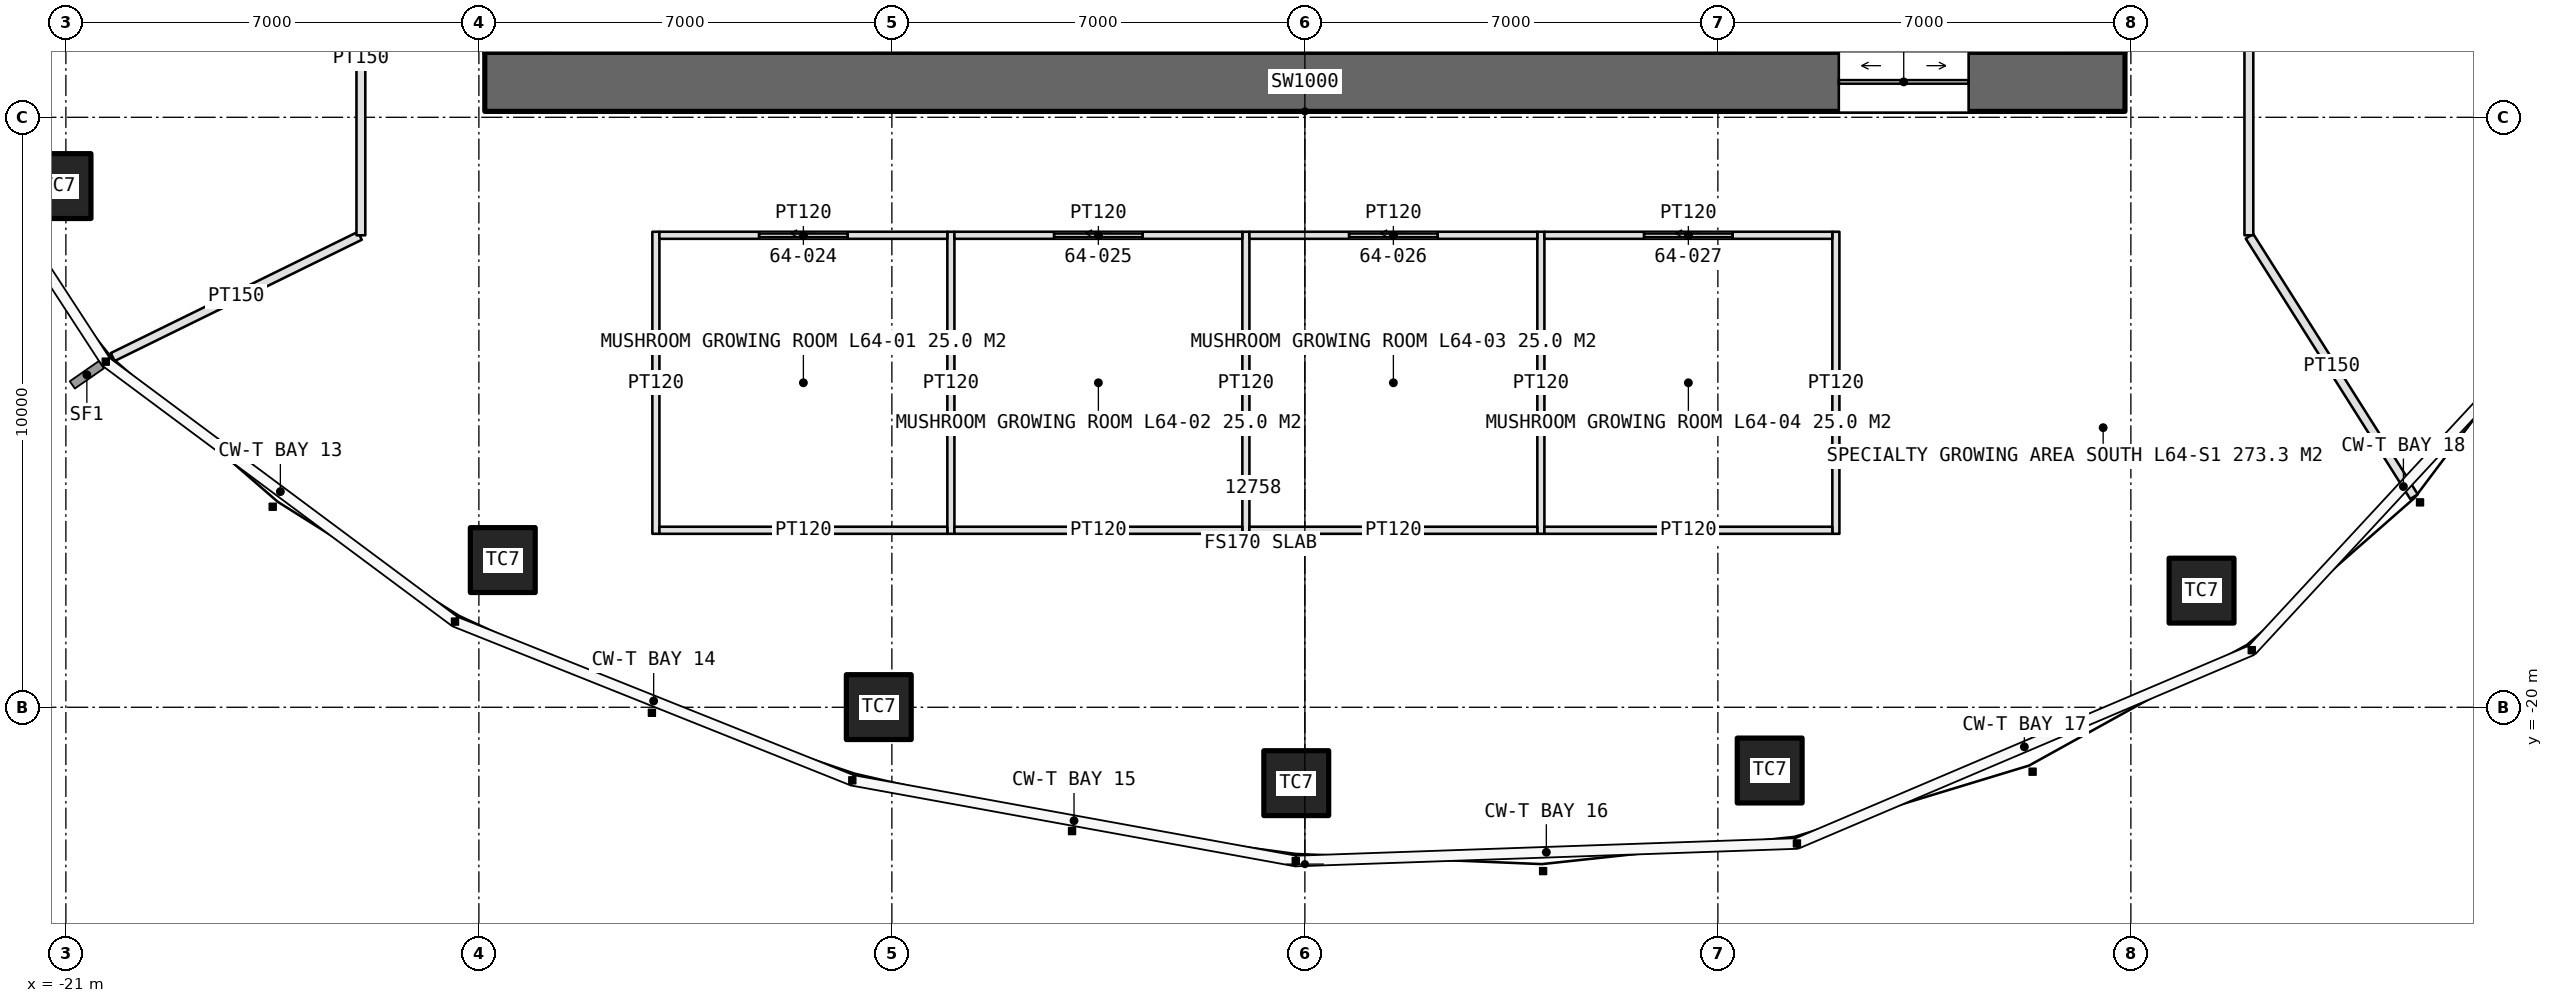
"""IFC4 building model, lengths in metres.
Left out: names, types, materials, properties, quantities, classifications, styles, units other than length and angle.
Written with IfcOpenShell. Run it as: python <this file> out.ifc"""

import sys

from ifc_helpers import new_model, si_unit, direction, frame, frame_2d, origin, origin_2d, place, context, subcontext, project, spatial, rectangle, extrude, element, fill, save


model = new_model("IFC4")
c1 = context("Model", 3, precision=1e-05, world=origin(), true_north=direction((0.0, 1.0)))
c2 = subcontext(c1, "Body", "Model", "MODEL_VIEW")
j1 = project(units=[si_unit("LENGTHUNIT", "METRE"), si_unit("PLANEANGLEUNIT", "RADIAN")], contexts=[c1])
p1 = place(None, origin())
s1 = spatial("IfcSite", under=j1, at=p1, CompositionType="ELEMENT")
p2 = place(p1, origin())
s2 = spatial("IfcBuilding", under=s1, at=p2, CompositionType="ELEMENT")
p3 = place(p2, frame((0.0, 0.0, 288.0)))
s3 = spatial("IfcBuildingStorey", under=s2, at=p3, CompositionType="ELEMENT", Elevation=288.0)
p4 = place(p3, frame((-13.9, -9.4, 0.0), z_axis=(0.0, 0.0, 1.0), x_axis=(1.0, 0.0, 0.0)))
e1 = element("IfcWall", 1, at=p4, inside=s3, PredefinedType="SHEAR", context=c2, shape_type="SweptSolid", body=[
    extrude(rectangle(XDim=27.8, YDim=1.0, at=frame_2d((13.9, 0.0))), origin(), (0.0, 0.0, 1.0), 4.2),
])
p5 = place(p4, frame((22.95, 0.0, 0.0)))
e2 = element("IfcOpeningElement", 2, at=p5, cuts=e1, PredefinedType="OPENING", context=c2, shape_type="SweptSolid", body=[
    extrude(rectangle(XDim=2.2, YDim=2.7, at=frame_2d((1.1, 1.35))), frame((0.0, 0.51, 0.0), z_axis=(0.0, -1.0, 0.0), x_axis=(1.0, 0.0, 0.0)), (0.0, 0.0, 1.0), 1.02),
])
for number, where, z_axis, x_axis in (
    (3, (-21.125, -11.166, 0.0), (0.0, 0.0, 1.0), (1.0, 0.0, 0.0)),
    (4, (-13.595, -17.505, 0.0), (0.0, 0.0, 1.0), (1.0, 0.0, 0.0)),
    (5, (-7.222, -19.997, 0.0), (0.0, 0.0, 1.0), (1.0, 0.0, 0.0)),
    (6, (-0.146, -21.286, 0.0), (0.0, 0.0, 1.0), (1.0, 0.0, 0.0)),
    (7, (7.878, -21.072, 0.0), (0.0, 0.0, 1.0), (1.0, 0.0, 0.0)),
    (8, (15.198, -18.023, 0.0), (0.0, 0.0, 1.0), (1.0, 0.0, 0.0)),
):
    element("IfcColumn", number, at=place(p3, frame(where, z_axis=z_axis, x_axis=x_axis)), inside=s3, PredefinedType="COLUMN", context=c2, shape_type="SweptSolid", body=[
        extrude(rectangle(XDim=1.1, YDim=1.1, at=origin_2d()), origin(), (0.0, 0.0, 1.0), 4.2),
    ])
for number, where, z_axis, x_axis in (
    (9, (-4.2, -4.7, 0.0), (0.0, 0.0, 1.0), (0.0, -1.0, 0.0)),
    (10, (-1.4, -4.7, 0.0), (0.0, 0.0, 1.0), (0.0, -1.0, 0.0)),
    (11, (1.4, -4.7, 0.0), (0.0, 0.0, 1.0), (0.0, -1.0, 0.0)),
    (12, (4.2, -4.7, 0.0), (0.0, 0.0, 1.0), (0.0, -1.0, 0.0)),
):
    element("IfcWall", number, at=place(p3, frame(where, z_axis=z_axis, x_axis=x_axis)), inside=s3, PredefinedType="PARTITIONING", context=c2, shape_type="SweptSolid", body=[
        extrude(rectangle(XDim=4.2, YDim=0.2, at=frame_2d((2.1, 0.0))), origin(), (0.0, 0.0, 1.0), 4.2),
    ])
for number, where, z_axis, x_axis in (
    (13, (-11.0, -11.94, 0.0), (0.0, 0.0, 1.0), (0.0, -1.0, 0.0)),
    (14, (-6.0, -11.94, 0.0), (0.0, 0.0, 1.0), (0.0, -1.0, 0.0)),
    (15, (-1.0, -11.94, 0.0), (0.0, 0.0, 1.0), (0.0, -1.0, 0.0)),
    (16, (4.0, -11.94, 0.0), (0.0, 0.0, 1.0), (0.0, -1.0, 0.0)),
    (17, (9.0, -11.94, 0.0), (0.0, 0.0, 1.0), (0.0, -1.0, 0.0)),
):
    element("IfcWall", number, at=place(p3, frame(where, z_axis=z_axis, x_axis=x_axis)), inside=s3, PredefinedType="PARTITIONING", context=c2, shape_type="SweptSolid", body=[
        extrude(rectangle(XDim=5.12, YDim=0.12, at=frame_2d((2.56, 0.0))), origin(), (0.0, 0.0, 1.0), 3.0),
    ])
p6 = place(p3, frame((-10.94, -12.0, 0.0), z_axis=(0.0, 0.0, 1.0), x_axis=(1.0, 0.0, 0.0)))
e18 = element("IfcWall", 18, at=p6, inside=s3, PredefinedType="PARTITIONING", context=c2, shape_type="SweptSolid", body=[
    extrude(rectangle(XDim=4.88, YDim=0.12, at=frame_2d((2.44, 0.0))), origin(), (0.0, 0.0, 1.0), 3.0),
])
p7 = place(p6, frame((1.69, 0.0, 0.0)))
e19 = element("IfcOpeningElement", 19, at=p7, cuts=e18, PredefinedType="OPENING", context=c2, shape_type="SweptSolid", body=[
    extrude(rectangle(XDim=1.5, YDim=2.5, at=frame_2d((0.75, 1.25))), frame((0.0, 0.07, 0.0), z_axis=(0.0, -1.0, 0.0), x_axis=(1.0, 0.0, 0.0)), (0.0, 0.0, 1.0), 0.14),
])
p8 = place(p3, frame((-10.94, -17.0, 0.0), z_axis=(0.0, 0.0, 1.0), x_axis=(1.0, 0.0, 0.0)))
e20 = element("IfcWall", 20, at=p8, inside=s3, PredefinedType="PARTITIONING", context=c2, shape_type="SweptSolid", body=[
    extrude(rectangle(XDim=4.88, YDim=0.12, at=frame_2d((2.44, 0.0))), origin(), (0.0, 0.0, 1.0), 3.0),
])
p9 = place(p3, frame((-5.94, -12.0, 0.0), z_axis=(0.0, 0.0, 1.0), x_axis=(1.0, 0.0, 0.0)))
e21 = element("IfcWall", 21, at=p9, inside=s3, PredefinedType="PARTITIONING", context=c2, shape_type="SweptSolid", body=[
    extrude(rectangle(XDim=4.88, YDim=0.12, at=frame_2d((2.44, 0.0))), origin(), (0.0, 0.0, 1.0), 3.0),
])
p10 = place(p9, frame((1.69, 0.0, 0.0)))
e22 = element("IfcOpeningElement", 22, at=p10, cuts=e21, PredefinedType="OPENING", context=c2, shape_type="SweptSolid", body=[
    extrude(rectangle(XDim=1.5, YDim=2.5, at=frame_2d((0.75, 1.25))), frame((0.0, 0.07, 0.0), z_axis=(0.0, -1.0, 0.0), x_axis=(1.0, 0.0, 0.0)), (0.0, 0.0, 1.0), 0.14),
])
p11 = place(p3, frame((-5.94, -17.0, 0.0), z_axis=(0.0, 0.0, 1.0), x_axis=(1.0, 0.0, 0.0)))
e23 = element("IfcWall", 23, at=p11, inside=s3, PredefinedType="PARTITIONING", context=c2, shape_type="SweptSolid", body=[
    extrude(rectangle(XDim=4.88, YDim=0.12, at=frame_2d((2.44, 0.0))), origin(), (0.0, 0.0, 1.0), 3.0),
])
p12 = place(p3, frame((-0.94, -12.0, 0.0), z_axis=(0.0, 0.0, 1.0), x_axis=(1.0, 0.0, 0.0)))
e24 = element("IfcWall", 24, at=p12, inside=s3, PredefinedType="PARTITIONING", context=c2, shape_type="SweptSolid", body=[
    extrude(rectangle(XDim=4.88, YDim=0.12, at=frame_2d((2.44, 0.0))), origin(), (0.0, 0.0, 1.0), 3.0),
])
p13 = place(p12, frame((1.69, 0.0, 0.0)))
e25 = element("IfcOpeningElement", 25, at=p13, cuts=e24, PredefinedType="OPENING", context=c2, shape_type="SweptSolid", body=[
    extrude(rectangle(XDim=1.5, YDim=2.5, at=frame_2d((0.75, 1.25))), frame((0.0, 0.07, 0.0), z_axis=(0.0, -1.0, 0.0), x_axis=(1.0, 0.0, 0.0)), (0.0, 0.0, 1.0), 0.14),
])
p14 = place(p3, frame((-0.94, -17.0, 0.0), z_axis=(0.0, 0.0, 1.0), x_axis=(1.0, 0.0, 0.0)))
e26 = element("IfcWall", 26, at=p14, inside=s3, PredefinedType="PARTITIONING", context=c2, shape_type="SweptSolid", body=[
    extrude(rectangle(XDim=4.88, YDim=0.12, at=frame_2d((2.44, 0.0))), origin(), (0.0, 0.0, 1.0), 3.0),
])
p15 = place(p3, frame((4.06, -12.0, 0.0), z_axis=(0.0, 0.0, 1.0), x_axis=(1.0, 0.0, 0.0)))
e27 = element("IfcWall", 27, at=p15, inside=s3, PredefinedType="PARTITIONING", context=c2, shape_type="SweptSolid", body=[
    extrude(rectangle(XDim=4.88, YDim=0.12, at=frame_2d((2.44, 0.0))), origin(), (0.0, 0.0, 1.0), 3.0),
])
p16 = place(p15, frame((1.69, 0.0, 0.0)))
e28 = element("IfcOpeningElement", 28, at=p16, cuts=e27, PredefinedType="OPENING", context=c2, shape_type="SweptSolid", body=[
    extrude(rectangle(XDim=1.5, YDim=2.5, at=frame_2d((0.75, 1.25))), frame((0.0, 0.07, 0.0), z_axis=(0.0, -1.0, 0.0), x_axis=(1.0, 0.0, 0.0)), (0.0, 0.0, 1.0), 0.14),
])
p17 = place(p3, frame((4.06, -17.0, 0.0), z_axis=(0.0, 0.0, 1.0), x_axis=(1.0, 0.0, 0.0)))
e29 = element("IfcWall", 29, at=p17, inside=s3, PredefinedType="PARTITIONING", context=c2, shape_type="SweptSolid", body=[
    extrude(rectangle(XDim=4.88, YDim=0.12, at=frame_2d((2.44, 0.0))), origin(), (0.0, 0.0, 1.0), 3.0),
])
p18 = place(p3, frame((-16.018, -12.009, 0.0), z_axis=(0.0, 0.0, 1.0), x_axis=(-0.897771840996, -0.440460805879, 0.0)))
e30 = element("IfcWall", 30, at=p18, inside=s3, PredefinedType="PARTITIONING", context=c2, shape_type="SweptSolid", body=[
    extrude(rectangle(XDim=4.666, YDim=0.15, at=frame_2d((2.333, 0.0))), origin(), (0.0, 0.0, 1.0), 3.0),
])
p19 = place(p3, frame((16.011, -12.017, 0.0), z_axis=(0.0, 0.0, 1.0), x_axis=(0.53415837449, -0.845384427916, 0.0)))
e31 = element("IfcWall", 31, at=p19, inside=s3, PredefinedType="PARTITIONING", context=c2, shape_type="SweptSolid", body=[
    extrude(rectangle(XDim=5.22, YDim=0.15, at=frame_2d((2.61, 0.0))), origin(), (0.0, 0.0, 1.0), 3.0),
])
p20 = place(p3, frame((16.0, -12.0, 0.0), z_axis=(0.0, 0.0, 1.0), x_axis=(0.0, 1.0, 0.0)))
e32 = element("IfcWall", 32, at=p20, inside=s3, PredefinedType="PARTITIONING", context=c2, shape_type="SweptSolid", body=[
    extrude(rectangle(XDim=7.0, YDim=0.15, at=frame_2d((3.5, 0.0))), origin(), (0.0, 0.0, 1.0), 3.0),
])
p21 = place(p20, frame((4.9, 0.0, 0.0)))
e33 = element("IfcOpeningElement", 33, at=p21, cuts=e32, PredefinedType="OPENING", context=c2, shape_type="SweptSolid", body=[
    extrude(rectangle(XDim=1.6, YDim=2.4, at=frame_2d((0.8, 1.2))), frame((0.0, 0.085, 0.0), z_axis=(0.0, -1.0, 0.0), x_axis=(1.0, 0.0, 0.0)), (0.0, 0.0, 1.0), 0.17),
])
p22 = place(p3, frame((-16.0, -6.0, 0.0), z_axis=(0.0, 0.0, 1.0), x_axis=(0.0, -1.0, 0.0)))
e34 = element("IfcWall", 34, at=p22, inside=s3, PredefinedType="PARTITIONING", context=c2, shape_type="SweptSolid", body=[
    extrude(rectangle(XDim=6.0, YDim=0.15, at=frame_2d((3.0, 0.0))), origin(), (0.0, 0.0, 1.0), 3.0),
])
p23 = place(p22, frame((0.4, 0.0, 0.0)))
e35 = element("IfcOpeningElement", 35, at=p23, cuts=e34, PredefinedType="OPENING", context=c2, shape_type="SweptSolid", body=[
    extrude(rectangle(XDim=1.6, YDim=2.4, at=frame_2d((0.8, 1.2))), frame((0.0, 0.085, 0.0), z_axis=(0.0, -1.0, 0.0), x_axis=(1.0, 0.0, 0.0)), (0.0, 0.0, 1.0), 0.17),
])
p24 = place(p5, origin())
e36 = element("IfcDoor", 36, at=p24, inside=s3, OperationType="DOUBLE_DOOR_SLIDING", PredefinedType="DOOR", context=c2, shape_type="SweptSolid", body=[
    extrude(rectangle(XDim=2.2, YDim=2.7, at=frame_2d((1.1, 1.35))), frame((0.0, 0.025, 0.0), z_axis=(0.0, -1.0, 0.0), x_axis=(1.0, 0.0, 0.0)), (0.0, 0.0, 1.0), 0.05),
])
fill(e2, e36)
p25 = place(p7, origin())
e37 = element("IfcDoor", 37, at=p25, inside=s3, OperationType="SLIDING_TO_LEFT", PredefinedType="DOOR", context=c2, shape_type="SweptSolid", body=[
    extrude(rectangle(XDim=1.5, YDim=2.5, at=frame_2d((0.75, 1.25))), frame((0.0, 0.025, 0.0), z_axis=(0.0, -1.0, 0.0), x_axis=(1.0, 0.0, 0.0)), (0.0, 0.0, 1.0), 0.05),
])
fill(e19, e37)
p26 = place(p10, origin())
e38 = element("IfcDoor", 38, at=p26, inside=s3, OperationType="SLIDING_TO_LEFT", PredefinedType="DOOR", context=c2, shape_type="SweptSolid", body=[
    extrude(rectangle(XDim=1.5, YDim=2.5, at=frame_2d((0.75, 1.25))), frame((0.0, 0.025, 0.0), z_axis=(0.0, -1.0, 0.0), x_axis=(1.0, 0.0, 0.0)), (0.0, 0.0, 1.0), 0.05),
])
fill(e22, e38)
p27 = place(p13, origin())
e39 = element("IfcDoor", 39, at=p27, inside=s3, OperationType="SLIDING_TO_LEFT", PredefinedType="DOOR", context=c2, shape_type="SweptSolid", body=[
    extrude(rectangle(XDim=1.5, YDim=2.5, at=frame_2d((0.75, 1.25))), frame((0.0, 0.025, 0.0), z_axis=(0.0, -1.0, 0.0), x_axis=(1.0, 0.0, 0.0)), (0.0, 0.0, 1.0), 0.05),
])
fill(e25, e39)
p28 = place(p16, origin())
e40 = element("IfcDoor", 40, at=p28, inside=s3, OperationType="SLIDING_TO_LEFT", PredefinedType="DOOR", context=c2, shape_type="SweptSolid", body=[
    extrude(rectangle(XDim=1.5, YDim=2.5, at=frame_2d((0.75, 1.25))), frame((0.0, 0.025, 0.0), z_axis=(0.0, -1.0, 0.0), x_axis=(1.0, 0.0, 0.0)), (0.0, 0.0, 1.0), 0.05),
])
fill(e28, e40)
save(model, sys.argv[1])
